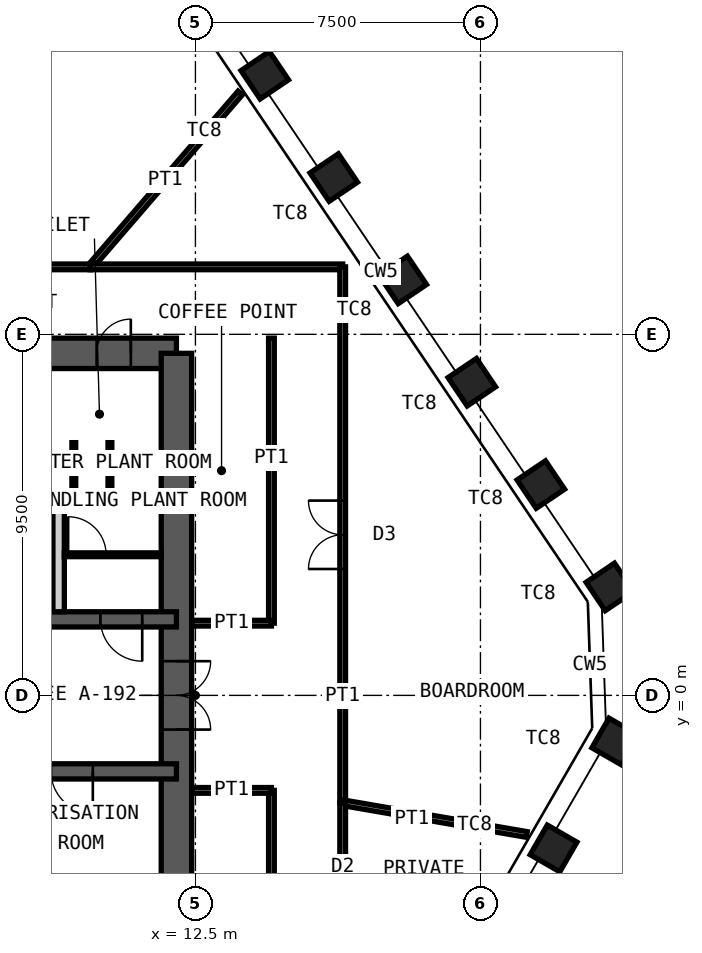
"""IFC4 building model, lengths in metres.
Left out: names, types, materials, properties, quantities, classifications, styles, units other than length and angle.
Written with IfcOpenShell. Run it as: python <this file> out.ifc"""

import sys

from ifc_helpers import new_model, si_unit, direction, frame, frame_2d, origin, origin_2d, place, context, subcontext, project, spatial, rectangle, hollow_rectangle, extrude, element, fill, save


model = new_model("IFC4")
c1 = context("Model", 3, precision=1e-05, world=origin(), true_north=direction((0.0, 1.0)))
c2 = subcontext(c1, "Body", "Model", "MODEL_VIEW")
j1 = project(units=[si_unit("LENGTHUNIT", "METRE"), si_unit("PLANEANGLEUNIT", "RADIAN")], contexts=[c1])
p1 = place(None, origin())
s1 = spatial("IfcSite", under=j1, at=p1, CompositionType="ELEMENT")
p2 = place(p1, origin())
s2 = spatial("IfcBuilding", under=s1, at=p2, CompositionType="ELEMENT")
p3 = place(p2, frame((0.0, 0.0, 304.0)))
s3 = spatial("IfcBuildingStorey", under=s2, at=p3, CompositionType="ELEMENT", Elevation=304.0)
for number, where, z_axis, x_axis in (
    (1, (14.324, 16.318, 0.0), (0.0, 0.0, 1.0), (-0.559, 0.829, 0.0)),
    (2, (16.141, 13.625, 0.0), (0.0, 0.0, 1.0), (-0.559, 0.829, 0.0)),
    (3, (17.957, 10.932, 0.0), (0.0, 0.0, 1.0), (-0.559, 0.829, 0.0)),
    (4, (19.773, 8.239, 0.0), (0.0, 0.0, 1.0), (-0.559, 0.829, 0.0)),
    (5, (21.589, 5.547, 0.0), (0.0, 0.0, 1.0), (-0.559, 0.829, 0.0)),
    (6, (23.406, 2.854, 0.0), (0.0, 0.0, 1.0), (-0.559, 0.829, 0.0)),
    (7, (23.548, -1.214, 0.0), (0.0, 0.0, 1.0), (0.5, 0.866, 0.0)),
    (8, (21.924, -4.027, 0.0), (0.0, 0.0, 1.0), (0.5, 0.866, 0.0)),
):
    element("IfcColumn", number, at=place(p3, frame(where, z_axis=z_axis, x_axis=x_axis)), inside=s3, PredefinedType="COLUMN", context=c2, shape_type="SweptSolid", body=[
        extrude(hollow_rectangle(XDim=0.9, YDim=0.9, WallThickness=0.05, at=origin_2d()), origin(), (0.0, 0.0, 1.0), 4.2),
    ])
p4 = place(p3, frame((-12.0, 9.0, 0.0), z_axis=(0.0, 0.0, 1.0), x_axis=(1.0, 0.0, 0.0)))
e9 = element("IfcWall", 9, at=p4, inside=s3, PredefinedType="SHEAR", context=c2, shape_type="SweptSolid", body=[
    extrude(rectangle(XDim=24.0, YDim=0.8, at=frame_2d((12.0, 0.0))), origin(), (0.0, 0.0, 1.0), 4.2),
])
p5 = place(p4, frame((10.4, 0.0, 0.0)))
e10 = element("IfcOpeningElement", 10, at=p5, cuts=e9, PredefinedType="OPENING", context=c2, shape_type="SweptSolid", body=[
    extrude(rectangle(XDim=1.0, YDim=2.1, at=frame_2d((0.5, 1.05))), frame((0.0, 0.41, 0.0), z_axis=(0.0, -1.0, 0.0), x_axis=(1.0, 0.0, 0.0)), (0.0, 0.0, 1.0), 0.82),
])
p6 = place(p4, frame((17.6, 0.0, 0.0)))
e11 = element("IfcOpeningElement", 11, at=p6, cuts=e9, PredefinedType="OPENING", context=c2, shape_type="SweptSolid", body=[
    extrude(rectangle(XDim=0.9, YDim=2.1, at=frame_2d((0.45, 1.05))), frame((0.0, 0.41, 0.0), z_axis=(0.0, -1.0, 0.0), x_axis=(1.0, 0.0, 0.0)), (0.0, 0.0, 1.0), 0.82),
])
p7 = place(p4, frame((21.9, 0.0, 0.0)))
e12 = element("IfcOpeningElement", 12, at=p7, cuts=e9, PredefinedType="OPENING", context=c2, shape_type="SweptSolid", body=[
    extrude(rectangle(XDim=0.9, YDim=2.1, at=frame_2d((0.45, 1.05))), frame((0.0, 0.41, 0.0), z_axis=(0.0, -1.0, 0.0), x_axis=(1.0, 0.0, 0.0)), (0.0, 0.0, 1.0), 0.82),
])
p8 = place(p3, frame((12.0, -9.0, 0.0), z_axis=(0.0, 0.0, 1.0), x_axis=(0.0, 1.0, 0.0)))
e13 = element("IfcWall", 13, at=p8, inside=s3, PredefinedType="SHEAR", context=c2, shape_type="SweptSolid", body=[
    extrude(rectangle(XDim=18.0, YDim=0.8, at=frame_2d((9.0, 0.0))), origin(), (0.0, 0.0, 1.0), 4.2),
])
p9 = place(p8, frame((8.1, 0.0, 0.0)))
e14 = element("IfcOpeningElement", 14, at=p9, cuts=e13, PredefinedType="OPENING", context=c2, shape_type="SweptSolid", body=[
    extrude(rectangle(XDim=1.8, YDim=2.1, at=frame_2d((0.9, 1.05))), frame((0.0, 0.41, 0.0), z_axis=(0.0, -1.0, 0.0), x_axis=(1.0, 0.0, 0.0)), (0.0, 0.0, 1.0), 0.82),
])
p10 = place(p3, frame((-12.0, 5.0, 0.0), z_axis=(0.0, 0.0, 1.0), x_axis=(1.0, 0.0, 0.0)))
e15 = element("IfcWall", 15, at=p10, inside=s3, PredefinedType="SHEAR", context=c2, shape_type="SweptSolid", body=[
    extrude(rectangle(XDim=24.0, YDim=0.3, at=frame_2d((12.0, 0.0))), origin(), (0.0, 0.0, 1.0), 4.2),
])
p11 = place(p3, frame((-12.0, 2.0, 0.0), z_axis=(0.0, 0.0, 1.0), x_axis=(1.0, 0.0, 0.0)))
e16 = element("IfcWall", 16, at=p11, inside=s3, PredefinedType="SHEAR", context=c2, shape_type="SweptSolid", body=[
    extrude(rectangle(XDim=24.0, YDim=0.4, at=frame_2d((12.0, 0.0))), origin(), (0.0, 0.0, 1.0), 4.2),
])
p12 = place(p11, frame((2.4, 0.0, 0.0)))
e17 = element("IfcOpeningElement", 17, at=p12, cuts=e16, PredefinedType="OPENING", context=c2, shape_type="SweptSolid", body=[
    extrude(rectangle(XDim=1.1, YDim=2.1, at=frame_2d((0.55, 1.05))), frame((0.0, 0.21, 0.0), z_axis=(0.0, -1.0, 0.0), x_axis=(1.0, 0.0, 0.0)), (0.0, 0.0, 1.0), 0.42),
])
p13 = place(p11, frame((22.0, 0.0, 0.0)))
e18 = element("IfcOpeningElement", 18, at=p13, cuts=e16, PredefinedType="OPENING", context=c2, shape_type="SweptSolid", body=[
    extrude(rectangle(XDim=1.1, YDim=2.1, at=frame_2d((0.55, 1.05))), frame((0.0, 0.21, 0.0), z_axis=(0.0, -1.0, 0.0), x_axis=(1.0, 0.0, 0.0)), (0.0, 0.0, 1.0), 0.42),
])
p14 = place(p11, frame((10.15, 0.0, 0.0)))
e19 = element("IfcOpeningElement", 19, at=p14, cuts=e16, PredefinedType="OPENING", context=c2, shape_type="SweptSolid", body=[
    extrude(rectangle(XDim=1.0, YDim=2.1, at=frame_2d((0.5, 1.05))), frame((0.0, 0.21, 0.0), z_axis=(0.0, -1.0, 0.0), x_axis=(1.0, 0.0, 0.0)), (0.0, 0.0, 1.0), 0.42),
])
p15 = place(p11, frame((6.9, 0.0, 0.0)))
e20 = element("IfcOpeningElement", 20, at=p15, cuts=e16, PredefinedType="OPENING", context=c2, shape_type="SweptSolid", body=[
    extrude(rectangle(XDim=1.0, YDim=2.1, at=frame_2d((0.5, 1.05))), frame((0.0, 0.21, 0.0), z_axis=(0.0, -1.0, 0.0), x_axis=(1.0, 0.0, 0.0)), (0.0, 0.0, 1.0), 0.42),
])
p16 = place(p11, frame((13.35, 0.0, 0.0)))
e21 = element("IfcOpeningElement", 21, at=p16, cuts=e16, PredefinedType="OPENING", context=c2, shape_type="SweptSolid", body=[
    extrude(rectangle(XDim=1.1, YDim=2.4, at=frame_2d((0.55, 1.2))), frame((0.0, 0.21, 0.0), z_axis=(0.0, -1.0, 0.0), x_axis=(1.0, 0.0, 0.0)), (0.0, 0.0, 1.0), 0.42),
])
p17 = place(p11, frame((16.15, 0.0, 0.0)))
e22 = element("IfcOpeningElement", 22, at=p17, cuts=e16, PredefinedType="OPENING", context=c2, shape_type="SweptSolid", body=[
    extrude(rectangle(XDim=1.1, YDim=2.4, at=frame_2d((0.55, 1.2))), frame((0.0, 0.21, 0.0), z_axis=(0.0, -1.0, 0.0), x_axis=(1.0, 0.0, 0.0)), (0.0, 0.0, 1.0), 0.42),
])
p18 = place(p11, frame((19.0, 0.0, 0.0)))
e23 = element("IfcOpeningElement", 23, at=p18, cuts=e16, PredefinedType="OPENING", context=c2, shape_type="SweptSolid", body=[
    extrude(rectangle(XDim=1.0, YDim=2.1, at=frame_2d((0.5, 1.05))), frame((0.0, 0.21, 0.0), z_axis=(0.0, -1.0, 0.0), x_axis=(1.0, 0.0, 0.0)), (0.0, 0.0, 1.0), 0.42),
])
p19 = place(p3, frame((-12.0, -2.0, 0.0), z_axis=(0.0, 0.0, 1.0), x_axis=(1.0, 0.0, 0.0)))
e24 = element("IfcWall", 24, at=p19, inside=s3, PredefinedType="SHEAR", context=c2, shape_type="SweptSolid", body=[
    extrude(rectangle(XDim=24.0, YDim=0.4, at=frame_2d((12.0, 0.0))), origin(), (0.0, 0.0, 1.0), 4.2),
])
p20 = place(p19, frame((1.1, 0.0, 0.0)))
e25 = element("IfcOpeningElement", 25, at=p20, cuts=e24, PredefinedType="OPENING", context=c2, shape_type="SweptSolid", body=[
    extrude(rectangle(XDim=1.1, YDim=2.1, at=frame_2d((0.55, 1.05))), frame((0.0, 0.21, 0.0), z_axis=(0.0, -1.0, 0.0), x_axis=(1.0, 0.0, 0.0)), (0.0, 0.0, 1.0), 0.42),
])
p21 = place(p19, frame((13.55, 0.0, 0.0)))
e26 = element("IfcOpeningElement", 26, at=p21, cuts=e24, PredefinedType="OPENING", context=c2, shape_type="SweptSolid", body=[
    extrude(rectangle(XDim=1.1, YDim=2.1, at=frame_2d((0.55, 1.05))), frame((0.0, 0.21, 0.0), z_axis=(0.0, -1.0, 0.0), x_axis=(1.0, 0.0, 0.0)), (0.0, 0.0, 1.0), 0.42),
])
p22 = place(p19, frame((20.7, 0.0, 0.0)))
e27 = element("IfcOpeningElement", 27, at=p22, cuts=e24, PredefinedType="OPENING", context=c2, shape_type="SweptSolid", body=[
    extrude(rectangle(XDim=1.1, YDim=2.1, at=frame_2d((0.55, 1.05))), frame((0.0, 0.21, 0.0), z_axis=(0.0, -1.0, 0.0), x_axis=(1.0, 0.0, 0.0)), (0.0, 0.0, 1.0), 0.42),
])
p23 = place(p19, frame((4.0, 0.0, 0.0)))
e28 = element("IfcOpeningElement", 28, at=p23, cuts=e24, PredefinedType="OPENING", context=c2, shape_type="SweptSolid", body=[
    extrude(rectangle(XDim=1.0, YDim=2.1, at=frame_2d((0.5, 1.05))), frame((0.0, 0.21, 0.0), z_axis=(0.0, -1.0, 0.0), x_axis=(1.0, 0.0, 0.0)), (0.0, 0.0, 1.0), 0.42),
])
p24 = place(p19, frame((6.8, 0.0, 0.0)))
e29 = element("IfcOpeningElement", 29, at=p24, cuts=e24, PredefinedType="OPENING", context=c2, shape_type="SweptSolid", body=[
    extrude(rectangle(XDim=1.0, YDim=2.1, at=frame_2d((0.5, 1.05))), frame((0.0, 0.21, 0.0), z_axis=(0.0, -1.0, 0.0), x_axis=(1.0, 0.0, 0.0)), (0.0, 0.0, 1.0), 0.42),
])
p25 = place(p19, frame((9.6, 0.0, 0.0)))
e30 = element("IfcOpeningElement", 30, at=p25, cuts=e24, PredefinedType="OPENING", context=c2, shape_type="SweptSolid", body=[
    extrude(rectangle(XDim=1.0, YDim=2.1, at=frame_2d((0.5, 1.05))), frame((0.0, 0.21, 0.0), z_axis=(0.0, -1.0, 0.0), x_axis=(1.0, 0.0, 0.0)), (0.0, 0.0, 1.0), 0.42),
])
p26 = place(p3, frame((8.9, 2.2, 0.0), z_axis=(0.0, 0.0, 1.0), x_axis=(0.0, 1.0, 0.0)))
e31 = element("IfcWall", 31, at=p26, inside=s3, PredefinedType="PARTITIONING", context=c2, shape_type="SweptSolid", body=[
    extrude(rectangle(XDim=2.65, YDim=0.3, at=frame_2d((1.325, 0.0))), origin(), (0.0, 0.0, 1.0), 3.98),
])
p27 = place(p3, frame((9.05, 3.7, 0.0), z_axis=(0.0, 0.0, 1.0), x_axis=(1.0, 0.0, 0.0)))
e32 = element("IfcWall", 32, at=p27, inside=s3, PredefinedType="PARTITIONING", context=c2, shape_type="SweptSolid", body=[
    extrude(rectangle(XDim=2.55, YDim=0.1, at=frame_2d((1.275, 0.0))), origin(), (0.0, 0.0, 1.0), 3.98),
])
p28 = place(p27, frame((0.1, 0.0, 0.0)))
e33 = element("IfcOpeningElement", 33, at=p28, cuts=e32, PredefinedType="OPENING", context=c2, shape_type="SweptSolid", body=[
    extrude(rectangle(XDim=1.0, YDim=2.4, at=frame_2d((0.5, 1.2))), frame((0.0, 0.06, 0.0), z_axis=(0.0, -1.0, 0.0), x_axis=(1.0, 0.0, 0.0)), (0.0, 0.0, 1.0), 0.12),
])
for number, where, z_axis, x_axis in (
    (34, (9.3, 5.15, 0.0), (0.0, 0.0, 1.0), (0.0, 1.0, 0.0)),
    (35, (10.25, 5.15, 0.0), (0.0, 0.0, 1.0), (0.0, 1.0, 0.0)),
):
    element("IfcWall", number, at=place(p3, frame(where, z_axis=z_axis, x_axis=x_axis)), inside=s3, PredefinedType="PARTITIONING", context=c2, shape_type="SweptSolid", body=[
        extrude(rectangle(XDim=1.5, YDim=0.1, at=frame_2d((0.75, 0.0))), origin(), (0.0, 0.0, 1.0), 2.1),
    ])
p29 = place(p3, frame((13.678, 15.85, 0.0), z_axis=(0.0, 0.0, 1.0), x_axis=(-0.65333269737, -0.757070925704, 0.0)))
e36 = element("IfcWall", 36, at=p29, inside=s3, PredefinedType="PARTITIONING", context=c2, shape_type="SweptSolid", body=[
    extrude(rectangle(XDim=6.044, YDim=0.15, at=frame_2d((3.022, 0.0))), origin(), (0.0, 0.0, 1.0), 3.33),
])
p30 = place(p3, frame((9.73, 11.275, 0.0), z_axis=(0.0, 0.0, 1.0), x_axis=(1.0, 0.0, 0.0)))
e37 = element("IfcWall", 37, at=p30, inside=s3, PredefinedType="PARTITIONING", context=c2, shape_type="SweptSolid", body=[
    extrude(rectangle(XDim=6.645, YDim=0.15, at=frame_2d((3.323, 0.0))), origin(), (0.0, 0.0, 1.0), 4.03),
])
p31 = place(p3, frame((16.375, 11.275, 0.0), z_axis=(0.0, 0.0, 1.0), x_axis=(0.0, -1.0, 0.0)))
e38 = element("IfcWall", 38, at=p31, inside=s3, PredefinedType="PARTITIONING", context=c2, shape_type="SweptSolid", body=[
    extrude(rectangle(XDim=14.1, YDim=0.15, at=frame_2d((7.05, 0.0))), origin(), (0.0, 0.0, 1.0), 4.03),
])
p32 = place(p31, frame((6.15, 0.0, 0.0)))
e39 = element("IfcOpeningElement", 39, at=p32, cuts=e38, PredefinedType="OPENING", context=c2, shape_type="SweptSolid", body=[
    extrude(rectangle(XDim=1.8, YDim=2.4, at=frame_2d((0.9, 1.2))), frame((0.0, 0.085, 0.0), z_axis=(0.0, -1.0, 0.0), x_axis=(1.0, 0.0, 0.0)), (0.0, 0.0, 1.0), 0.17),
])
p33 = place(p3, frame((21.219, -3.66, 0.0), z_axis=(0.0, 0.0, 1.0), x_axis=(-0.98545065103, 0.169961802723, 0.0)))
e40 = element("IfcWall", 40, at=p33, inside=s3, PredefinedType="PARTITIONING", context=c2, shape_type="SweptSolid", body=[
    extrude(rectangle(XDim=4.916, YDim=0.15, at=frame_2d((2.458, 0.0))), origin(), (0.0, 0.0, 1.0), 4.03),
])
p34 = place(p3, frame((16.375, -2.825, 0.0), z_axis=(0.0, 0.0, 1.0), x_axis=(0.0, -1.0, 0.0)))
e41 = element("IfcWall", 41, at=p34, inside=s3, PredefinedType="PARTITIONING", context=c2, shape_type="SweptSolid", body=[
    extrude(rectangle(XDim=5.606, YDim=0.15, at=frame_2d((2.803, 0.0))), origin(), (0.0, 0.0, 1.0), 4.03),
])
p35 = place(p34, frame((2.303, 0.0, 0.0)))
e42 = element("IfcOpeningElement", 42, at=p35, cuts=e41, PredefinedType="OPENING", context=c2, shape_type="SweptSolid", body=[
    extrude(rectangle(XDim=1.0, YDim=2.4, at=frame_2d((0.5, 1.2))), frame((0.0, 0.085, 0.0), z_axis=(0.0, -1.0, 0.0), x_axis=(1.0, 0.0, 0.0)), (0.0, 0.0, 1.0), 0.17),
])
p36 = place(p3, frame((-0.543, 11.275, 0.0), z_axis=(0.0, 0.0, 1.0), x_axis=(1.0, 0.0, 0.0)))
e43 = element("IfcWall", 43, at=p36, inside=s3, PredefinedType="PARTITIONING", context=c2, shape_type="SweptSolid", body=[
    extrude(rectangle(XDim=10.273, YDim=0.15, at=frame_2d((5.137, 0.0))), origin(), (0.0, 0.0, 1.0), 4.03),
])
p37 = place(p36, frame((4.237, 0.0, 0.0)))
e44 = element("IfcOpeningElement", 44, at=p37, cuts=e43, PredefinedType="OPENING", context=c2, shape_type="SweptSolid", body=[
    extrude(rectangle(XDim=1.8, YDim=2.4, at=frame_2d((0.9, 1.2))), frame((0.0, 0.085, 0.0), z_axis=(0.0, -1.0, 0.0), x_axis=(1.0, 0.0, 0.0)), (0.0, 0.0, 1.0), 0.17),
])
p38 = place(p3, frame((14.5, 1.9, 0.0), z_axis=(0.0, 0.0, 1.0), x_axis=(0.0, 1.0, 0.0)))
e45 = element("IfcWall", 45, at=p38, inside=s3, PredefinedType="PARTITIONING", context=c2, shape_type="SweptSolid", body=[
    extrude(rectangle(XDim=7.5, YDim=0.15, at=frame_2d((3.75, 0.0))), origin(), (0.0, 0.0, 1.0), 4.03),
])
p39 = place(p3, frame((12.4, 1.9, 0.0), z_axis=(0.0, 0.0, 1.0), x_axis=(1.0, 0.0, 0.0)))
e46 = element("IfcWall", 46, at=p39, inside=s3, PredefinedType="PARTITIONING", context=c2, shape_type="SweptSolid", body=[
    extrude(rectangle(XDim=2.1, YDim=0.15, at=frame_2d((1.05, 0.0))), origin(), (0.0, 0.0, 1.0), 2.93),
])
p40 = place(p3, frame((14.5, -9.4, 0.0), z_axis=(0.0, 0.0, 1.0), x_axis=(0.0, 1.0, 0.0)))
e47 = element("IfcWall", 47, at=p40, inside=s3, PredefinedType="PARTITIONING", context=c2, shape_type="SweptSolid", body=[
    extrude(rectangle(XDim=6.9, YDim=0.15, at=frame_2d((3.45, 0.0))), origin(), (0.0, 0.0, 1.0), 4.03),
])
p41 = place(p3, frame((12.4, -2.5, 0.0), z_axis=(0.0, 0.0, 1.0), x_axis=(1.0, 0.0, 0.0)))
e48 = element("IfcWall", 48, at=p41, inside=s3, PredefinedType="PARTITIONING", context=c2, shape_type="SweptSolid", body=[
    extrude(rectangle(XDim=2.1, YDim=0.15, at=frame_2d((1.05, 0.0))), origin(), (0.0, 0.0, 1.0), 3.33),
])
p42 = place(p7, origin())
e49 = element("IfcDoor", 49, at=p42, inside=s3, OperationType="SINGLE_SWING_LEFT", PredefinedType="DOOR", context=c2, shape_type="SweptSolid", body=[
    extrude(rectangle(XDim=0.9, YDim=2.1, at=frame_2d((0.45, 1.05))), frame((0.0, 0.025, 0.0), z_axis=(0.0, -1.0, 0.0), x_axis=(1.0, 0.0, 0.0)), (0.0, 0.0, 1.0), 0.05),
])
fill(e12, e49)
p43 = place(p13, origin())
e50 = element("IfcDoor", 50, at=p43, inside=s3, OperationType="SINGLE_SWING_RIGHT", PredefinedType="DOOR", context=c2, shape_type="SweptSolid", body=[
    extrude(rectangle(XDim=1.1, YDim=2.1, at=frame_2d((0.55, 1.05))), frame((0.0, 0.025, 0.0), z_axis=(0.0, -1.0, 0.0), x_axis=(1.0, 0.0, 0.0)), (0.0, 0.0, 1.0), 0.05),
])
fill(e18, e50)
p44 = place(p22, origin())
e51 = element("IfcDoor", 51, at=p44, inside=s3, OperationType="SINGLE_SWING_RIGHT", PredefinedType="DOOR", context=c2, shape_type="SweptSolid", body=[
    extrude(rectangle(XDim=1.1, YDim=2.1, at=frame_2d((0.55, 1.05))), frame((0.0, 0.025, 0.0), z_axis=(0.0, -1.0, 0.0), x_axis=(1.0, 0.0, 0.0)), (0.0, 0.0, 1.0), 0.05),
])
fill(e27, e51)
p45 = place(p9, origin())
e52 = element("IfcDoor", 52, at=p45, inside=s3, OperationType="DOUBLE_DOOR_DOUBLE_SWING", PredefinedType="DOOR", context=c2, shape_type="SweptSolid", body=[
    extrude(rectangle(XDim=1.8, YDim=2.1, at=frame_2d((0.9, 1.05))), frame((0.0, 0.025, 0.0), z_axis=(0.0, -1.0, 0.0), x_axis=(1.0, 0.0, 0.0)), (0.0, 0.0, 1.0), 0.05),
])
fill(e14, e52)
p46 = place(p28, origin())
e53 = element("IfcDoor", 53, at=p46, inside=s3, OperationType="SINGLE_SWING_RIGHT", PredefinedType="DOOR", context=c2, shape_type="SweptSolid", body=[
    extrude(rectangle(XDim=1.0, YDim=2.4, at=frame_2d((0.5, 1.2))), frame((0.0, 0.025, 0.0), z_axis=(0.0, -1.0, 0.0), x_axis=(1.0, 0.0, 0.0)), (0.0, 0.0, 1.0), 0.05),
])
fill(e33, e53)
p47 = place(p32, origin())
e54 = element("IfcDoor", 54, at=p47, inside=s3, OperationType="DOUBLE_DOOR_DOUBLE_SWING", PredefinedType="DOOR", context=c2, shape_type="SweptSolid", body=[
    extrude(rectangle(XDim=1.8, YDim=2.4, at=frame_2d((0.9, 1.2))), frame((0.0, 0.025, 0.0), z_axis=(0.0, -1.0, 0.0), x_axis=(1.0, 0.0, 0.0)), (0.0, 0.0, 1.0), 0.05),
])
fill(e39, e54)
save(model, sys.argv[1])
